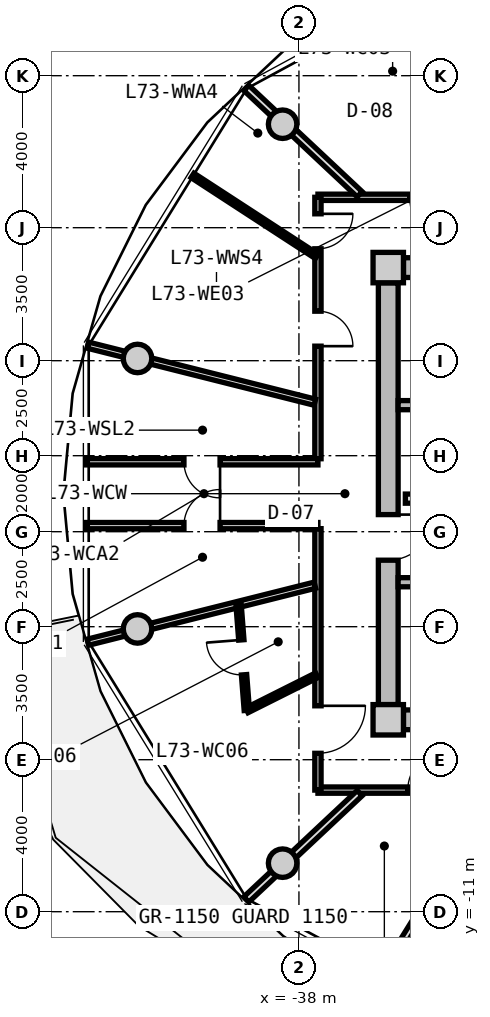
"""IFC4 building model, lengths in metres.
Left out: names, types, materials, properties, quantities, classifications, styles, units other than length and angle.
Written with IfcOpenShell. Run it as: python <this file> out.ifc"""

import sys

from ifc_helpers import new_model, si_unit, direction, frame, frame_2d, origin, origin_2d, place, context, subcontext, project, spatial, rectangle, circle, extrude, source, transform, mapped, element, fill, save


model = new_model("IFC4")
c1 = context("Model", 3, precision=1e-05, world=origin(), true_north=direction((0.0, 1.0)))
c2 = subcontext(c1, "Body", "Model", "MODEL_VIEW")
j1 = project(units=[si_unit("LENGTHUNIT", "METRE"), si_unit("PLANEANGLEUNIT", "RADIAN")], contexts=[c1])
p1 = place(None, origin())
s1 = spatial("IfcSite", under=j1, at=p1, CompositionType="ELEMENT")
p2 = place(p1, origin())
s2 = spatial("IfcBuilding", under=s1, at=p2, CompositionType="ELEMENT")
p3 = place(p2, frame((0.0, 0.0, 235.25)))
s3 = spatial("IfcBuildingStorey", under=s2, at=p3, CompositionType="ELEMENT", Elevation=235.25)
m1 = source(origin(), c2, "Body", "SweptSolid", [
    extrude(rectangle(XDim=0.8, YDim=0.8, at=origin_2d()), origin(), (0.0, 0.0, 1.0), 3.05),
])
for number, where, z_axis, x_axis in (
    (1, (-35.65, -5.95, 0.0), (0.0, 0.0, 1.0), (1.0, 0.0, 0.0)),
    (2, (-35.65, 5.95, 0.0), (0.0, 0.0, 1.0), (1.0, 0.0, 0.0)),
):
    element("IfcColumn", number, at=place(p3, frame(where, z_axis=z_axis, x_axis=x_axis)), inside=s3, PredefinedType="COLUMN", context=c2, shape_type="MappedRepresentation", body=[
        mapped(m1, transform((0.0, 0.0, 0.0), x_axis=(1.0, 0.0, 0.0), y_axis=(0.0, 1.0, 0.0), z_axis=(0.0, 0.0, 1.0), scale=1.0)),
    ])
m2 = source(origin(), c2, "Body", "SweptSolid", [
    extrude(rectangle(XDim=14.5, YDim=0.52, at=frame_2d((7.25, 0.0))), origin(), (0.0, 0.0, 1.0), 2.81),
])
for number, where, z_axis, x_axis in (
    (3, (-35.25, 5.95, 0.0), (0.0, 0.0, 1.0), (1.0, 0.0, 0.0)),
    (4, (-20.75, -5.95, 0.0), (0.0, 0.0, 1.0), (-1.0, 0.0, 0.0)),
):
    element("IfcWall", number, at=place(p3, frame(where, z_axis=z_axis, x_axis=x_axis)), inside=s3, PredefinedType="SHEAR", context=c2, shape_type="MappedRepresentation", body=[
        mapped(m2, transform((0.0, 0.0, 0.0), x_axis=(1.0, 0.0, 0.0), y_axis=(0.0, 1.0, 0.0), z_axis=(0.0, 0.0, 1.0), scale=1.0)),
    ])
m3 = source(origin(), c2, "Body", "SweptSolid", [
    extrude(rectangle(XDim=11.1, YDim=0.52, at=frame_2d((5.55, 0.0))), origin(), (0.0, 0.0, 1.0), 2.81),
])
p4 = place(p3, frame((-35.65, -5.55, 0.0), z_axis=(0.0, 0.0, 1.0), x_axis=(0.0, 1.0, 0.0)))
e5 = element("IfcWall", 5, at=p4, inside=s3, PredefinedType="SHEAR", context=c2, shape_type="MappedRepresentation", body=[
    mapped(m3, transform((0.0, 0.0, 0.0), x_axis=(1.0, 0.0, 0.0), y_axis=(0.0, 1.0, 0.0), z_axis=(0.0, 0.0, 1.0), scale=1.0)),
])
p5 = place(p4, frame((3.8, 0.0, 0.0)))
e6 = element("IfcOpeningElement", 6, at=p5, cuts=e5, PredefinedType="OPENING", context=c2, shape_type="SweptSolid", body=[
    extrude(rectangle(XDim=1.2, YDim=2.15, at=frame_2d((0.6, 1.075))), frame((0.0, 0.27, 0.0), z_axis=(0.0, -1.0, 0.0), x_axis=(1.0, 0.0, 0.0)), (0.0, 0.0, 1.0), 0.54),
])
m4 = source(origin(), c2, "Body", "SweptSolid", [
    extrude(circle(Radius=0.375, at=origin_2d()), origin(), (0.0, 0.0, 1.0), 3.05),
])
for number, where, z_axis, x_axis in (
    (7, (-38.43, 9.723, 0.0), (0.0, 0.0, 1.0), (1.0, 0.0, 0.0)),
    (8, (-42.247, 3.559, 0.0), (0.0, 0.0, 1.0), (1.0, 0.0, 0.0)),
    (9, (-42.247, -3.559, 0.0), (0.0, 0.0, 1.0), (1.0, 0.0, 0.0)),
    (10, (-38.43, -9.723, 0.0), (0.0, 0.0, 1.0), (1.0, 0.0, 0.0)),
):
    element("IfcColumn", number, at=place(p3, frame(where, z_axis=z_axis, x_axis=x_axis)), inside=s3, PredefinedType="COLUMN", context=c2, shape_type="MappedRepresentation", body=[
        mapped(m4, transform((0.0, 0.0, 0.0), x_axis=(1.0, 0.0, 0.0), y_axis=(0.0, 1.0, 0.0), z_axis=(0.0, 0.0, 1.0), scale=1.0)),
    ])
m5 = source(origin(), c2, "Body", "SweptSolid", [
    extrude(rectangle(XDim=7.93, YDim=0.24, at=frame_2d((3.965, 0.0))), origin(), (0.0, 0.0, 1.0), 2.81),
])
p6 = place(p3, frame((-35.39, 2.33, 0.0), z_axis=(0.0, 0.0, 1.0), x_axis=(1.0, 0.0, 0.0)))
e11 = element("IfcWall", 11, at=p6, inside=s3, PredefinedType="PARTITIONING", context=c2, shape_type="MappedRepresentation", body=[
    mapped(m5, transform((0.0, 0.0, 0.0), x_axis=(1.0, 0.0, 0.0), y_axis=(0.0, 1.0, 0.0), z_axis=(0.0, 0.0, 1.0), scale=1.0)),
])
p7 = place(p3, frame((-35.39, -2.33, 0.0), z_axis=(0.0, 0.0, 1.0), x_axis=(1.0, 0.0, 0.0)))
e12 = element("IfcWall", 12, at=p7, inside=s3, PredefinedType="PARTITIONING", context=c2, shape_type="MappedRepresentation", body=[
    mapped(m5, transform((0.0, 0.0, 0.0), x_axis=(1.0, 0.0, 0.0), y_axis=(0.0, 1.0, 0.0), z_axis=(0.0, 0.0, 1.0), scale=1.0)),
])
p8 = place(p7, frame((1.05, 0.0, 0.0)))
e13 = element("IfcOpeningElement", 13, at=p8, cuts=e12, PredefinedType="OPENING", context=c2, shape_type="SweptSolid", body=[
    extrude(rectangle(XDim=1.1, YDim=2.15, at=frame_2d((0.55, 1.075))), frame((0.0, 0.13, 0.0), z_axis=(0.0, -1.0, 0.0), x_axis=(1.0, 0.0, 0.0)), (0.0, 0.0, 1.0), 0.26),
])
m6 = source(origin(), c2, "Body", "SweptSolid", [
    extrude(rectangle(XDim=7.62, YDim=0.24, at=frame_2d((3.81, 0.0))), origin(), (0.0, 0.0, 1.0), 2.795),
])
p9 = place(p3, frame((-35.2, -0.13, 0.0), z_axis=(0.0, 0.0, 1.0), x_axis=(1.0, 0.0, 0.0)))
e14 = element("IfcWall", 14, at=p9, inside=s3, PredefinedType="PARTITIONING", context=c2, shape_type="MappedRepresentation", body=[
    mapped(m6, transform((0.0, 0.0, 0.0), x_axis=(1.0, 0.0, 0.0), y_axis=(0.0, 1.0, 0.0), z_axis=(0.0, 0.0, 1.0), scale=1.0)),
])
p10 = place(p9, frame((6.22, 0.0, 0.0)))
e15 = element("IfcOpeningElement", 15, at=p10, cuts=e14, PredefinedType="OPENING", context=c2, shape_type="SweptSolid", body=[
    extrude(rectangle(XDim=1.0, YDim=2.1, at=frame_2d((0.5, 1.05))), frame((0.0, 0.13, 0.0), z_axis=(0.0, -1.0, 0.0), x_axis=(1.0, 0.0, 0.0)), (0.0, 0.0, 1.0), 0.26),
])
p11 = place(p9, frame((2.4, 0.0, 0.0)))
e16 = element("IfcOpeningElement", 16, at=p11, cuts=e14, PredefinedType="OPENING", context=c2, shape_type="SweptSolid", body=[
    extrude(rectangle(XDim=1.0, YDim=2.1, at=frame_2d((0.5, 1.05))), frame((0.0, 0.13, 0.0), z_axis=(0.0, -1.0, 0.0), x_axis=(1.0, 0.0, 0.0)), (0.0, 0.0, 1.0), 0.26),
])
m7 = source(origin(), c2, "Body", "SweptSolid", [
    extrude(rectangle(XDim=8.58, YDim=0.165, at=frame_2d((4.29, 0.0))), origin(), (0.0, 0.0, 1.0), 2.795),
])
p12 = place(p3, frame((-37.5, 7.8, 0.0), z_axis=(0.0, 0.0, 1.0), x_axis=(1.0, 0.0, 0.0)))
e17 = element("IfcWall", 17, at=p12, inside=s3, PredefinedType="PARTITIONING", context=c2, shape_type="MappedRepresentation", body=[
    mapped(m7, transform((0.0, 0.0, 0.0), x_axis=(1.0, 0.0, 0.0), y_axis=(0.0, 1.0, 0.0), z_axis=(0.0, 0.0, 1.0), scale=1.0)),
])
p13 = place(p12, frame((2.415, 0.0, 0.0)))
e18 = element("IfcOpeningElement", 18, at=p13, cuts=e17, PredefinedType="OPENING", context=c2, shape_type="SweptSolid", body=[
    extrude(rectangle(XDim=1.25, YDim=2.2, at=frame_2d((0.625, 1.1))), frame((0.0, 0.093, 0.0), z_axis=(0.0, -1.0, 0.0), x_axis=(1.0, 0.0, 0.0)), (0.0, 0.0, 1.0), 0.185),
])
m8 = source(origin(), c2, "Body", "SweptSolid", [
    extrude(rectangle(XDim=19.0, YDim=0.165, at=frame_2d((9.5, 0.0))), origin(), (0.0, 0.0, 1.0), 2.795),
])
p14 = place(p3, frame((-18.5, -7.8, 0.0), z_axis=(0.0, 0.0, 1.0), x_axis=(-1.0, 0.0, 0.0)))
e19 = element("IfcWall", 19, at=p14, inside=s3, PredefinedType="PARTITIONING", context=c2, shape_type="MappedRepresentation", body=[
    mapped(m8, transform((0.0, 0.0, 0.0), x_axis=(1.0, 0.0, 0.0), y_axis=(0.0, 1.0, 0.0), z_axis=(0.0, 0.0, 1.0), scale=1.0)),
])
p15 = place(p14, frame((15.586, 0.0, 0.0)))
e20 = element("IfcOpeningElement", 20, at=p15, cuts=e19, PredefinedType="OPENING", context=c2, shape_type="SweptSolid", body=[
    extrude(rectangle(XDim=1.05, YDim=2.15, at=frame_2d((0.525, 1.075))), frame((0.0, 0.093, 0.0), z_axis=(0.0, -1.0, 0.0), x_axis=(1.0, 0.0, 0.0)), (0.0, 0.0, 1.0), 0.185),
])
p16 = place(p14, frame((12.465, 0.0, 0.0)))
e21 = element("IfcOpeningElement", 21, at=p16, cuts=e19, PredefinedType="OPENING", context=c2, shape_type="SweptSolid", body=[
    extrude(rectangle(XDim=1.05, YDim=2.15, at=frame_2d((0.525, 1.075))), frame((0.0, 0.093, 0.0), z_axis=(0.0, -1.0, 0.0), x_axis=(1.0, 0.0, 0.0)), (0.0, 0.0, 1.0), 0.185),
])
p17 = place(p14, frame((8.875, 0.0, 0.0)))
e22 = element("IfcOpeningElement", 22, at=p17, cuts=e19, PredefinedType="OPENING", context=c2, shape_type="SweptSolid", body=[
    extrude(rectangle(XDim=1.25, YDim=2.2, at=frame_2d((0.625, 1.1))), frame((0.0, 0.093, 0.0), z_axis=(0.0, -1.0, 0.0), x_axis=(1.0, 0.0, 0.0)), (0.0, 0.0, 1.0), 0.185),
])
p18 = place(p14, frame((3.559, 0.0, 0.0)))
e23 = element("IfcOpeningElement", 23, at=p18, cuts=e19, PredefinedType="OPENING", context=c2, shape_type="SweptSolid", body=[
    extrude(rectangle(XDim=1.25, YDim=2.2, at=frame_2d((0.625, 1.1))), frame((0.0, 0.093, 0.0), z_axis=(0.0, -1.0, 0.0), x_axis=(1.0, 0.0, 0.0)), (0.0, 0.0, 1.0), 0.185),
])
m9 = source(origin(), c2, "Body", "SweptSolid", [
    extrude(rectangle(XDim=6.88, YDim=0.165, at=frame_2d((3.44, 0.0))), origin(), (0.0, 0.0, 1.0), 2.795),
])
p19 = place(p3, frame((-37.5, -7.8, 0.0), z_axis=(0.0, 0.0, 1.0), x_axis=(0.0, 1.0, 0.0)))
e24 = element("IfcWall", 24, at=p19, inside=s3, PredefinedType="PARTITIONING", context=c2, shape_type="MappedRepresentation", body=[
    mapped(m9, transform((0.0, 0.0, 0.0), x_axis=(1.0, 0.0, 0.0), y_axis=(0.0, 1.0, 0.0), z_axis=(0.0, 0.0, 1.0), scale=1.0)),
])
p20 = place(p19, frame((0.968, 0.0, 0.0)))
e25 = element("IfcOpeningElement", 25, at=p20, cuts=e24, PredefinedType="OPENING", context=c2, shape_type="SweptSolid", body=[
    extrude(rectangle(XDim=1.25, YDim=2.2, at=frame_2d((0.625, 1.1))), frame((0.0, 0.093, 0.0), z_axis=(0.0, -1.0, 0.0), x_axis=(1.0, 0.0, 0.0)), (0.0, 0.0, 1.0), 0.185),
])
p21 = place(p3, frame((-37.5, 0.92, 0.0), z_axis=(0.0, 0.0, 1.0), x_axis=(0.0, 1.0, 0.0)))
e26 = element("IfcWall", 26, at=p21, inside=s3, PredefinedType="PARTITIONING", context=c2, shape_type="MappedRepresentation", body=[
    mapped(m9, transform((0.0, 0.0, 0.0), x_axis=(1.0, 0.0, 0.0), y_axis=(0.0, 1.0, 0.0), z_axis=(0.0, 0.0, 1.0), scale=1.0)),
])
p22 = place(p21, frame((5.525, 0.0, 0.0)))
e27 = element("IfcOpeningElement", 27, at=p22, cuts=e26, PredefinedType="OPENING", context=c2, shape_type="SweptSolid", body=[
    extrude(rectangle(XDim=0.92, YDim=2.1, at=frame_2d((0.46, 1.05))), frame((0.0, 0.093, 0.0), z_axis=(0.0, -1.0, 0.0), x_axis=(1.0, 0.0, 0.0)), (0.0, 0.0, 1.0), 0.185),
])
p23 = place(p21, frame((2.962, 0.0, 0.0)))
e28 = element("IfcOpeningElement", 28, at=p23, cuts=e26, PredefinedType="OPENING", context=c2, shape_type="SweptSolid", body=[
    extrude(rectangle(XDim=0.92, YDim=2.1, at=frame_2d((0.46, 1.05))), frame((0.0, 0.093, 0.0), z_axis=(0.0, -1.0, 0.0), x_axis=(1.0, 0.0, 0.0)), (0.0, 0.0, 1.0), 0.185),
])
m10 = source(origin(), c2, "Body", "SweptSolid", [
    extrude(rectangle(XDim=6.157, YDim=0.165, at=frame_2d((3.079, 0.0))), origin(), (0.0, 0.0, 1.0), 2.395),
])
for number, where, z_axis, x_axis in (
    (29, (-37.58, 2.407, 0.0), (0.0, 0.0, 1.0), (-0.97, 0.244, 0.0)),
    (30, (-37.58, -2.407, 0.0), (0.0, 0.0, 1.0), (-0.97, -0.244, 0.0)),
):
    element("IfcWall", number, at=place(p3, frame(where, z_axis=z_axis, x_axis=x_axis)), inside=s3, PredefinedType="PARTITIONING", context=c2, shape_type="MappedRepresentation", body=[
        mapped(m10, transform((0.0, 0.0, 0.0), x_axis=(1.0, 0.0, 0.0), y_axis=(0.0, 1.0, 0.0), z_axis=(0.0, 0.0, 1.0), scale=1.0)),
    ])
m11 = source(origin(), c2, "Body", "SweptSolid", [
    extrude(rectangle(XDim=6.101, YDim=0.165, at=frame_2d((3.051, 0.0))), origin(), (0.0, 0.0, 1.0), 2.795),
])
p24 = place(p3, frame((-43.601, 0.84, 0.0), z_axis=(0.0, 0.0, 1.0), x_axis=(1.0, 0.0, 0.0)))
e31 = element("IfcWall", 31, at=p24, inside=s3, PredefinedType="PARTITIONING", context=c2, shape_type="MappedRepresentation", body=[
    mapped(m11, transform((0.0, 0.0, 0.0), x_axis=(1.0, 0.0, 0.0), y_axis=(0.0, 1.0, 0.0), z_axis=(0.0, 0.0, 1.0), scale=1.0)),
])
p25 = place(p24, frame((2.576, 0.0, 0.0)))
e32 = element("IfcOpeningElement", 32, at=p25, cuts=e31, PredefinedType="OPENING", context=c2, shape_type="SweptSolid", body=[
    extrude(rectangle(XDim=0.95, YDim=2.1, at=frame_2d((0.475, 1.05))), frame((0.0, 0.093, 0.0), z_axis=(0.0, -1.0, 0.0), x_axis=(1.0, 0.0, 0.0)), (0.0, 0.0, 1.0), 0.185),
])
p26 = place(p3, frame((-37.5, -0.84, 0.0), z_axis=(0.0, 0.0, 1.0), x_axis=(-1.0, 0.0, 0.0)))
e33 = element("IfcWall", 33, at=p26, inside=s3, PredefinedType="PARTITIONING", context=c2, shape_type="MappedRepresentation", body=[
    mapped(m11, transform((0.0, 0.0, 0.0), x_axis=(1.0, 0.0, 0.0), y_axis=(0.0, 1.0, 0.0), z_axis=(0.0, 0.0, 1.0), scale=1.0)),
])
p27 = place(p26, frame((2.576, 0.0, 0.0)))
e34 = element("IfcOpeningElement", 34, at=p27, cuts=e33, PredefinedType="OPENING", context=c2, shape_type="SweptSolid", body=[
    extrude(rectangle(XDim=0.95, YDim=2.1, at=frame_2d((0.475, 1.05))), frame((0.0, 0.093, 0.0), z_axis=(0.0, -1.0, 0.0), x_axis=(1.0, 0.0, 0.0)), (0.0, 0.0, 1.0), 0.185),
])
m12 = source(origin(), c2, "Body", "SweptSolid", [
    extrude(rectangle(XDim=4.089, YDim=0.19, at=frame_2d((2.044, 0.0))), origin(), (0.0, 0.0, 1.0), 2.395),
])
p28 = place(p3, frame((-36.402, 7.88, 0.0), z_axis=(0.0, 0.0, 1.0), x_axis=(-0.729401273609, 0.684086092577, 0.0)))
e35 = element("IfcWall", 35, at=p28, inside=s3, PredefinedType="PARTITIONING", context=c2, shape_type="MappedRepresentation", body=[
    mapped(m12, transform((0.0, 0.0, 0.0), x_axis=(1.0, 0.0, 0.0), y_axis=(0.0, 1.0, 0.0), z_axis=(0.0, 0.0, 1.0), scale=1.0)),
])
m13 = source(origin(), c2, "Body", "SweptSolid", [
    extrude(rectangle(XDim=3.904, YDim=0.14, at=frame_2d((1.952, 0.0))), origin(), (0.0, 0.0, 1.0), 2.795),
])
p29 = place(p3, frame((-37.53, 6.246, 0.0), z_axis=(0.0, 0.0, 1.0), x_axis=(-0.838024687996, 0.545632314209, 0.0)))
e36 = element("IfcWall", 36, at=p29, inside=s3, PredefinedType="PARTITIONING", context=c2, shape_type="MappedRepresentation", body=[
    mapped(m13, transform((0.0, 0.0, 0.0), x_axis=(1.0, 0.0, 0.0), y_axis=(0.0, 1.0, 0.0), z_axis=(0.0, 0.0, 1.0), scale=1.0)),
])
p30 = place(p3, frame((-36.402, -7.88, 0.0), z_axis=(0.0, 0.0, 1.0), x_axis=(-0.729401273609, -0.684086092577, 0.0)))
e37 = element("IfcWall", 37, at=p30, inside=s3, PredefinedType="PARTITIONING", context=c2, shape_type="MappedRepresentation", body=[
    mapped(m12, transform((0.0, 0.0, 0.0), x_axis=(1.0, 0.0, 0.0), y_axis=(0.0, 1.0, 0.0), z_axis=(0.0, 0.0, 1.0), scale=1.0)),
])
m14 = source(origin(), c2, "Body", "SweptSolid", [
    extrude(rectangle(XDim=2.06, YDim=0.14, at=frame_2d((1.03, 0.0))), origin(), (0.0, 0.0, 1.0), 2.795),
])
p31 = place(p3, frame((-37.53, -4.778, 0.0), z_axis=(0.0, 0.0, 1.0), x_axis=(-0.893952568722, -0.448161583444, 0.0)))
e38 = element("IfcWall", 38, at=p31, inside=s3, PredefinedType="PARTITIONING", context=c2, shape_type="MappedRepresentation", body=[
    mapped(m14, transform((0.0, 0.0, 0.0), x_axis=(1.0, 0.0, 0.0), y_axis=(0.0, 1.0, 0.0), z_axis=(0.0, 0.0, 1.0), scale=1.0)),
])
m15 = source(origin(), c2, "Body", "SweptSolid", [
    extrude(rectangle(XDim=2.798, YDim=0.14, at=frame_2d((1.399, 0.0))), origin(), (0.0, 0.0, 1.0), 2.795),
])
p32 = place(p3, frame((-39.371, -5.701, 0.0), z_axis=(0.0, 0.0, 1.0), x_axis=(-0.077823984089, 0.996967114553, 0.0)))
e39 = element("IfcWall", 39, at=p32, inside=s3, PredefinedType="PARTITIONING", context=c2, shape_type="MappedRepresentation", body=[
    mapped(m15, transform((0.0, 0.0, 0.0), x_axis=(1.0, 0.0, 0.0), y_axis=(0.0, 1.0, 0.0), z_axis=(0.0, 0.0, 1.0), scale=1.0)),
])
p33 = place(p32, frame((0.939, 0.0, 0.0)))
e40 = element("IfcOpeningElement", 40, at=p33, cuts=e39, PredefinedType="OPENING", context=c2, shape_type="SweptSolid", body=[
    extrude(rectangle(XDim=0.92, YDim=2.1, at=frame_2d((0.46, 1.05))), frame((0.0, 0.08, 0.0), z_axis=(0.0, -1.0, 0.0), x_axis=(1.0, 0.0, 0.0)), (0.0, 0.0, 1.0), 0.16),
])
m16 = source(origin(), c2, "Body", "SweptSolid", [
    extrude(rectangle(XDim=5.652, YDim=0.19, at=frame_2d((2.826, 0.0))), origin(), (0.0, 0.0, 1.0), 2.795),
])
p34 = place(p3, frame((-32.794, -7.83, 0.0), z_axis=(0.0, 0.0, 1.0), x_axis=(-0.527566076956, -0.84951399897, 0.0)))
e41 = element("IfcWall", 41, at=p34, inside=s3, PredefinedType="PARTITIONING", context=c2, shape_type="MappedRepresentation", body=[
    mapped(m16, transform((0.0, 0.0, 0.0), x_axis=(1.0, 0.0, 0.0), y_axis=(0.0, 1.0, 0.0), z_axis=(0.0, 0.0, 1.0), scale=1.0)),
])
m17 = source(origin(), c2, "Body", "SweptSolid", [
    extrude(rectangle(XDim=1.2, YDim=2.15, at=frame_2d((0.6, 1.075))), frame((0.0, 0.025, 0.0), z_axis=(0.0, -1.0, 0.0), x_axis=(1.0, 0.0, 0.0)), (0.0, 0.0, 1.0), 0.05),
])
p35 = place(p5, frame((1.2, 0.0, 0.0), z_axis=(0.0, 0.0, 1.0), x_axis=(-1.0, 0.0, 0.0)))
e42 = element("IfcDoor", 42, at=p35, inside=s3, OperationType="SINGLE_SWING_LEFT", PredefinedType="DOOR", context=c2, shape_type="MappedRepresentation", body=[
    mapped(m17, transform((0.0, 0.0, 0.0), x_axis=(1.0, 0.0, 0.0), y_axis=(0.0, 1.0, 0.0), z_axis=(0.0, 0.0, 1.0), scale=1.0)),
])
fill(e6, e42)
m18 = source(origin(), c2, "Body", "SweptSolid", [
    extrude(rectangle(XDim=0.95, YDim=2.1, at=frame_2d((0.475, 1.05))), frame((0.0, 0.025, 0.0), z_axis=(0.0, -1.0, 0.0), x_axis=(1.0, 0.0, 0.0)), (0.0, 0.0, 1.0), 0.05),
])
p36 = place(p27, frame((0.95, 0.0, 0.0), z_axis=(0.0, 0.0, 1.0), x_axis=(-1.0, 0.0, 0.0)))
e43 = element("IfcDoor", 43, at=p36, inside=s3, OperationType="SINGLE_SWING_RIGHT", PredefinedType="DOOR", context=c2, shape_type="MappedRepresentation", body=[
    mapped(m18, transform((0.0, 0.0, 0.0), x_axis=(1.0, 0.0, 0.0), y_axis=(0.0, 1.0, 0.0), z_axis=(0.0, 0.0, 1.0), scale=1.0)),
])
fill(e34, e43)
p37 = place(p25, frame((0.95, 0.0, 0.0), z_axis=(0.0, 0.0, 1.0), x_axis=(-1.0, 0.0, 0.0)))
e44 = element("IfcDoor", 44, at=p37, inside=s3, OperationType="SINGLE_SWING_LEFT", PredefinedType="DOOR", context=c2, shape_type="MappedRepresentation", body=[
    mapped(m18, transform((0.0, 0.0, 0.0), x_axis=(1.0, 0.0, 0.0), y_axis=(0.0, 1.0, 0.0), z_axis=(0.0, 0.0, 1.0), scale=1.0)),
])
fill(e32, e44)
m19 = source(origin(), c2, "Body", "SweptSolid", [
    extrude(rectangle(XDim=1.25, YDim=2.2, at=frame_2d((0.625, 1.1))), frame((0.0, 0.025, 0.0), z_axis=(0.0, -1.0, 0.0), x_axis=(1.0, 0.0, 0.0)), (0.0, 0.0, 1.0), 0.05),
])
p38 = place(p13, frame((1.25, 0.0, 0.0), z_axis=(0.0, 0.0, 1.0), x_axis=(-1.0, 0.0, 0.0)))
e45 = element("IfcDoor", 45, at=p38, inside=s3, OperationType="SINGLE_SWING_LEFT", PredefinedType="DOOR", context=c2, shape_type="MappedRepresentation", body=[
    mapped(m19, transform((0.0, 0.0, 0.0), x_axis=(1.0, 0.0, 0.0), y_axis=(0.0, 1.0, 0.0), z_axis=(0.0, 0.0, 1.0), scale=1.0)),
])
fill(e18, e45)
m20 = source(origin(), c2, "Body", "SweptSolid", [
    extrude(rectangle(XDim=0.92, YDim=2.1, at=frame_2d((0.46, 1.05))), frame((0.0, 0.025, 0.0), z_axis=(0.0, -1.0, 0.0), x_axis=(1.0, 0.0, 0.0)), (0.0, 0.0, 1.0), 0.05),
])
p39 = place(p22, frame((0.92, 0.0, 0.0), z_axis=(0.0, 0.0, 1.0), x_axis=(-1.0, 0.0, 0.0)))
e46 = element("IfcDoor", 46, at=p39, inside=s3, OperationType="SINGLE_SWING_LEFT", PredefinedType="DOOR", context=c2, shape_type="MappedRepresentation", body=[
    mapped(m20, transform((0.0, 0.0, 0.0), x_axis=(1.0, 0.0, 0.0), y_axis=(0.0, 1.0, 0.0), z_axis=(0.0, 0.0, 1.0), scale=1.0)),
])
fill(e27, e46)
p40 = place(p23, frame((0.92, 0.0, 0.0), z_axis=(0.0, 0.0, 1.0), x_axis=(-1.0, 0.0, 0.0)))
e47 = element("IfcDoor", 47, at=p40, inside=s3, OperationType="SINGLE_SWING_RIGHT", PredefinedType="DOOR", context=c2, shape_type="MappedRepresentation", body=[
    mapped(m20, transform((0.0, 0.0, 0.0), x_axis=(1.0, 0.0, 0.0), y_axis=(0.0, 1.0, 0.0), z_axis=(0.0, 0.0, 1.0), scale=1.0)),
])
fill(e28, e47)
p41 = place(p20, frame((1.25, 0.0, 0.0), z_axis=(0.0, 0.0, 1.0), x_axis=(-1.0, 0.0, 0.0)))
e48 = element("IfcDoor", 48, at=p41, inside=s3, OperationType="SINGLE_SWING_LEFT", PredefinedType="DOOR", context=c2, shape_type="MappedRepresentation", body=[
    mapped(m19, transform((0.0, 0.0, 0.0), x_axis=(1.0, 0.0, 0.0), y_axis=(0.0, 1.0, 0.0), z_axis=(0.0, 0.0, 1.0), scale=1.0)),
])
fill(e25, e48)
p42 = place(p33, origin())
e49 = element("IfcDoor", 49, at=p42, inside=s3, OperationType="SINGLE_SWING_RIGHT", PredefinedType="DOOR", context=c2, shape_type="MappedRepresentation", body=[
    mapped(m20, transform((0.0, 0.0, 0.0), x_axis=(1.0, 0.0, 0.0), y_axis=(0.0, 1.0, 0.0), z_axis=(0.0, 0.0, 1.0), scale=1.0)),
])
fill(e40, e49)
m21 = source(origin(), c2, "Body", "SweptSolid", [
    extrude(rectangle(XDim=1.05, YDim=2.15, at=frame_2d((0.525, 1.075))), frame((0.0, 0.025, 0.0), z_axis=(0.0, -1.0, 0.0), x_axis=(1.0, 0.0, 0.0)), (0.0, 0.0, 1.0), 0.05),
])
p43 = place(p15, frame((1.05, 0.0, 0.0), z_axis=(0.0, 0.0, 1.0), x_axis=(-1.0, 0.0, 0.0)))
e50 = element("IfcDoor", 50, at=p43, inside=s3, OperationType="SINGLE_SWING_RIGHT", PredefinedType="DOOR", context=c2, shape_type="MappedRepresentation", body=[
    mapped(m21, transform((0.0, 0.0, 0.0), x_axis=(1.0, 0.0, 0.0), y_axis=(0.0, 1.0, 0.0), z_axis=(0.0, 0.0, 1.0), scale=1.0)),
])
fill(e20, e50)
save(model, sys.argv[1])
